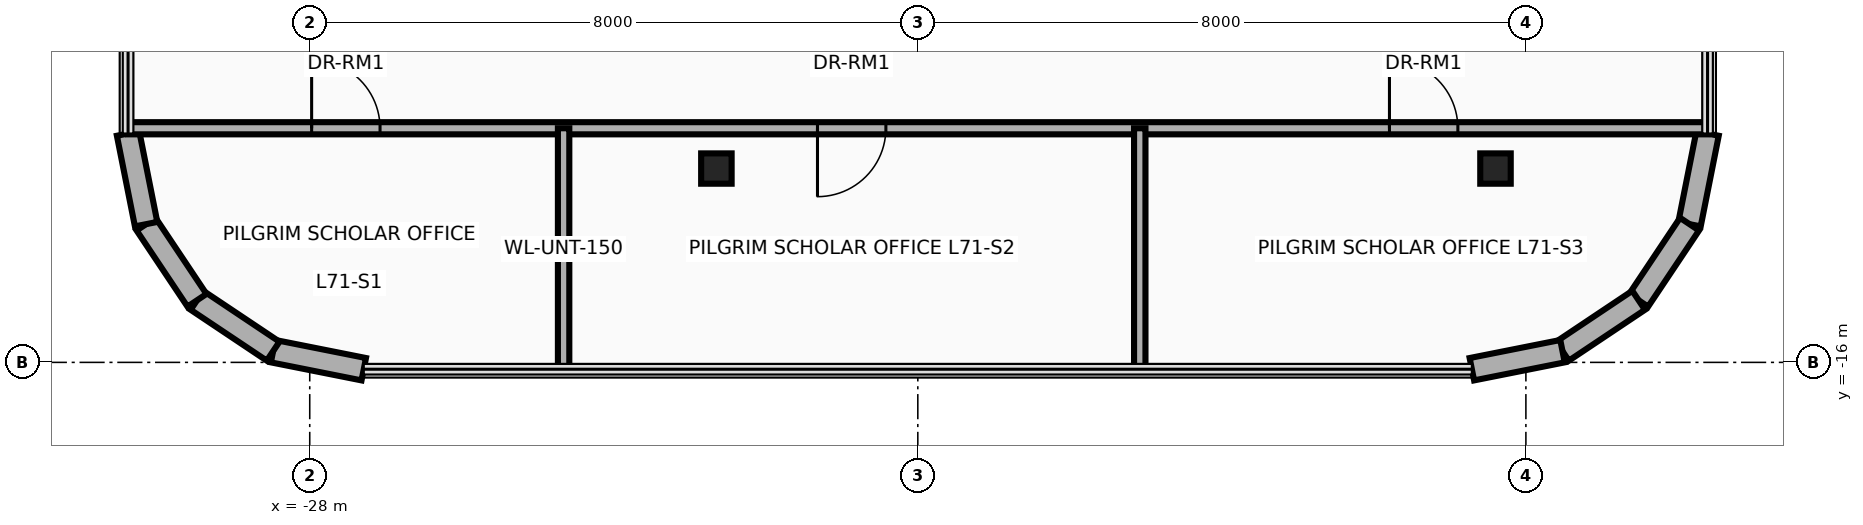
"""IFC4 building model, lengths in metres.
Left out: names, types, materials, properties, quantities, classifications, styles, units other than length and angle.
Written with IfcOpenShell. Run it as: python <this file> out.ifc"""

import sys

from ifc_helpers import new_model, si_unit, direction, frame, frame_2d, origin, origin_2d, place, context, subcontext, project, spatial, rectangle, i_section, extrude, source, transform, mapped, element, fill, save


model = new_model("IFC4")
c1 = context("Model", 3, precision=1e-05, world=origin(), true_north=direction((0.0, 1.0)))
c2 = subcontext(c1, "Body", "Model", "MODEL_VIEW")
j1 = project(units=[si_unit("LENGTHUNIT", "METRE"), si_unit("PLANEANGLEUNIT", "RADIAN")], contexts=[c1])
p1 = place(None, origin())
s1 = spatial("IfcSite", under=j1, at=p1, CompositionType="ELEMENT")
p2 = place(p1, origin())
s2 = spatial("IfcBuilding", under=s1, at=p2, CompositionType="ELEMENT")
p3 = place(p2, frame((0.0, 0.0, 273.0)))
s3 = spatial("IfcBuildingStorey", under=s2, at=p3, CompositionType="ELEMENT", Elevation=273.0)
m1 = source(origin(), c2, "Body", "SweptSolid", [
    extrude(i_section(OverallWidth=0.401, OverallDepth=0.399, WebThickness=0.025, FlangeThickness=0.04, at=origin_2d()), origin(), (0.0, 0.0, 1.0), 3.5),
])
for number, where, z_axis, x_axis in (
    (1, (-22.65, -13.45, 0.0), (0.0, 0.0, 1.0), (1.0, 0.0, 0.0)),
    (2, (-12.4, -13.45, 0.0), (0.0, 0.0, 1.0), (1.0, 0.0, 0.0)),
):
    element("IfcColumn", number, at=place(p3, frame(where, z_axis=z_axis, x_axis=x_axis)), inside=s3, PredefinedType="COLUMN", context=c2, shape_type="MappedRepresentation", body=[
        mapped(m1, transform((0.0, 0.0, 0.0), x_axis=(1.0, 0.0, 0.0), y_axis=(0.0, 1.0, 0.0), z_axis=(0.0, 0.0, 1.0), scale=1.0)),
    ])
p4 = place(p3, frame((-9.61, -12.989, 0.0), z_axis=(0.0, 0.0, 1.0), x_axis=(-0.194996050505, -0.980804027463, 0.0)))
e3 = element("IfcWall", 3, at=p4, inside=s3, PredefinedType="SOLIDWALL", context=c2, shape_type="SweptSolid", body=[
    extrude(rectangle(XDim=1.216, YDim=0.3, at=frame_2d((0.608, 0.0))), origin(), (0.0, 0.0, 1.0), 3.26),
])
for number, where, z_axis, x_axis in (
    (4, (-9.847, -14.182, 0.0), (0.0, 0.0, 1.0), (-0.556, -0.831, 0.0)),
    (5, (-10.517, -15.183, 0.0), (0.0, 0.0, 1.0), (-0.831, -0.556, 0.0)),
):
    element("IfcWall", number, at=place(p3, frame(where, z_axis=z_axis, x_axis=x_axis)), inside=s3, PredefinedType="SOLIDWALL", context=c2, shape_type="SweptSolid", body=[
        extrude(rectangle(XDim=1.205, YDim=0.3, at=frame_2d((0.603, 0.0))), origin(), (0.0, 0.0, 1.0), 3.26),
    ])
for number, where, z_axis, x_axis in (
    (6, (-11.518, -15.853, 0.0), (0.0, 0.0, 1.0), (-0.981, -0.195, 0.0)),
    (7, (-27.289, -16.09, 0.0), (0.0, 0.0, 1.0), (-0.981, 0.195, 0.0)),
):
    element("IfcWall", number, at=place(p3, frame(where, z_axis=z_axis, x_axis=x_axis)), inside=s3, PredefinedType="SOLIDWALL", context=c2, shape_type="SweptSolid", body=[
        extrude(rectangle(XDim=1.216, YDim=0.3, at=frame_2d((0.608, 0.0))), origin(), (0.0, 0.0, 1.0), 3.26),
    ])
for number, where, z_axis, x_axis in (
    (8, (-28.482, -15.853, 0.0), (0.0, 0.0, 1.0), (-0.831, 0.556, 0.0)),
    (9, (-29.483, -15.183, 0.0), (0.0, 0.0, 1.0), (-0.556, 0.831, 0.0)),
):
    element("IfcWall", number, at=place(p3, frame(where, z_axis=z_axis, x_axis=x_axis)), inside=s3, PredefinedType="SOLIDWALL", context=c2, shape_type="SweptSolid", body=[
        extrude(rectangle(XDim=1.205, YDim=0.3, at=frame_2d((0.603, 0.0))), origin(), (0.0, 0.0, 1.0), 3.26),
    ])
p5 = place(p3, frame((-30.153, -14.182, 0.0), z_axis=(0.0, 0.0, 1.0), x_axis=(-0.194996050505, 0.980804027463, 0.0)))
e10 = element("IfcWall", 10, at=p5, inside=s3, PredefinedType="SOLIDWALL", context=c2, shape_type="SweptSolid", body=[
    extrude(rectangle(XDim=1.216, YDim=0.3, at=frame_2d((0.608, 0.0))), origin(), (0.0, 0.0, 1.0), 3.26),
])
p6 = place(p3, frame((-30.39, -12.92, 0.0), z_axis=(0.0, 0.0, 1.0), x_axis=(1.0, 0.0, 0.0)))
e11 = element("IfcWall", 11, at=p6, inside=s3, PredefinedType="PARTITIONING", context=c2, shape_type="SweptSolid", body=[
    extrude(rectangle(XDim=20.78, YDim=0.16, at=frame_2d((10.39, 0.0))), origin(), (0.0, 0.0, 1.0), 2.634),
])
p7 = place(p6, frame((2.415, 0.0, 0.0)))
e12 = element("IfcOpeningElement", 12, at=p7, cuts=e11, PredefinedType="OPENING", context=c2, shape_type="SweptSolid", body=[
    extrude(rectangle(XDim=0.9, YDim=2.1, at=frame_2d((0.45, 1.05))), frame((0.0, 0.095, 0.0), z_axis=(0.0, -1.0, 0.0), x_axis=(1.0, 0.0, 0.0)), (0.0, 0.0, 1.0), 0.19),
])
p8 = place(p6, frame((9.07, 0.0, 0.0)))
e13 = element("IfcOpeningElement", 13, at=p8, cuts=e11, PredefinedType="OPENING", context=c2, shape_type="SweptSolid", body=[
    extrude(rectangle(XDim=0.9, YDim=2.1, at=frame_2d((0.45, 1.05))), frame((0.0, 0.095, 0.0), z_axis=(0.0, -1.0, 0.0), x_axis=(1.0, 0.0, 0.0)), (0.0, 0.0, 1.0), 0.19),
])
p9 = place(p6, frame((16.595, 0.0, 0.0)))
e14 = element("IfcOpeningElement", 14, at=p9, cuts=e11, PredefinedType="OPENING", context=c2, shape_type="SweptSolid", body=[
    extrude(rectangle(XDim=0.9, YDim=2.1, at=frame_2d((0.45, 1.05))), frame((0.0, 0.095, 0.0), z_axis=(0.0, -1.0, 0.0), x_axis=(1.0, 0.0, 0.0)), (0.0, 0.0, 1.0), 0.19),
])
p10 = place(p3, frame((-24.66, -16.09, 0.0), z_axis=(0.0, 0.0, 1.0), x_axis=(0.0, 1.0, 0.0)))
e15 = element("IfcWall", 15, at=p10, inside=s3, PredefinedType="PARTITIONING", context=c2, shape_type="SweptSolid", body=[
    extrude(rectangle(XDim=3.17, YDim=0.15, at=frame_2d((1.585, 0.0))), origin(), (0.0, 0.0, 1.0), 3.26),
])
p11 = place(p3, frame((-17.08, -16.09, 0.0), z_axis=(0.0, 0.0, 1.0), x_axis=(0.0, 1.0, 0.0)))
e16 = element("IfcWall", 16, at=p11, inside=s3, PredefinedType="PARTITIONING", context=c2, shape_type="SweptSolid", body=[
    extrude(rectangle(XDim=3.17, YDim=0.15, at=frame_2d((1.585, 0.0))), origin(), (0.0, 0.0, 1.0), 2.706),
])
p12 = place(p7, origin())
e17 = element("IfcDoor", 17, at=p12, inside=s3, OperationType="SINGLE_SWING_RIGHT", PredefinedType="DOOR", context=c2, shape_type="SweptSolid", body=[
    extrude(rectangle(XDim=0.9, YDim=2.1, at=frame_2d((0.45, 1.05))), frame((0.0, 0.025, 0.0), z_axis=(0.0, -1.0, 0.0), x_axis=(1.0, 0.0, 0.0)), (0.0, 0.0, 1.0), 0.05),
])
fill(e12, e17)
p13 = place(p8, frame((0.9, 0.0, 0.0), z_axis=(0.0, 0.0, 1.0), x_axis=(-1.0, 0.0, 0.0)))
e18 = element("IfcDoor", 18, at=p13, inside=s3, OperationType="SINGLE_SWING_LEFT", PredefinedType="DOOR", context=c2, shape_type="SweptSolid", body=[
    extrude(rectangle(XDim=0.9, YDim=2.1, at=frame_2d((0.45, 1.05))), frame((0.0, 0.025, 0.0), z_axis=(0.0, -1.0, 0.0), x_axis=(1.0, 0.0, 0.0)), (0.0, 0.0, 1.0), 0.05),
])
fill(e13, e18)
p14 = place(p9, origin())
e19 = element("IfcDoor", 19, at=p14, inside=s3, OperationType="SINGLE_SWING_RIGHT", PredefinedType="DOOR", context=c2, shape_type="SweptSolid", body=[
    extrude(rectangle(XDim=0.9, YDim=2.1, at=frame_2d((0.45, 1.05))), frame((0.0, 0.025, 0.0), z_axis=(0.0, -1.0, 0.0), x_axis=(1.0, 0.0, 0.0)), (0.0, 0.0, 1.0), 0.05),
])
fill(e14, e19)
save(model, sys.argv[1])
